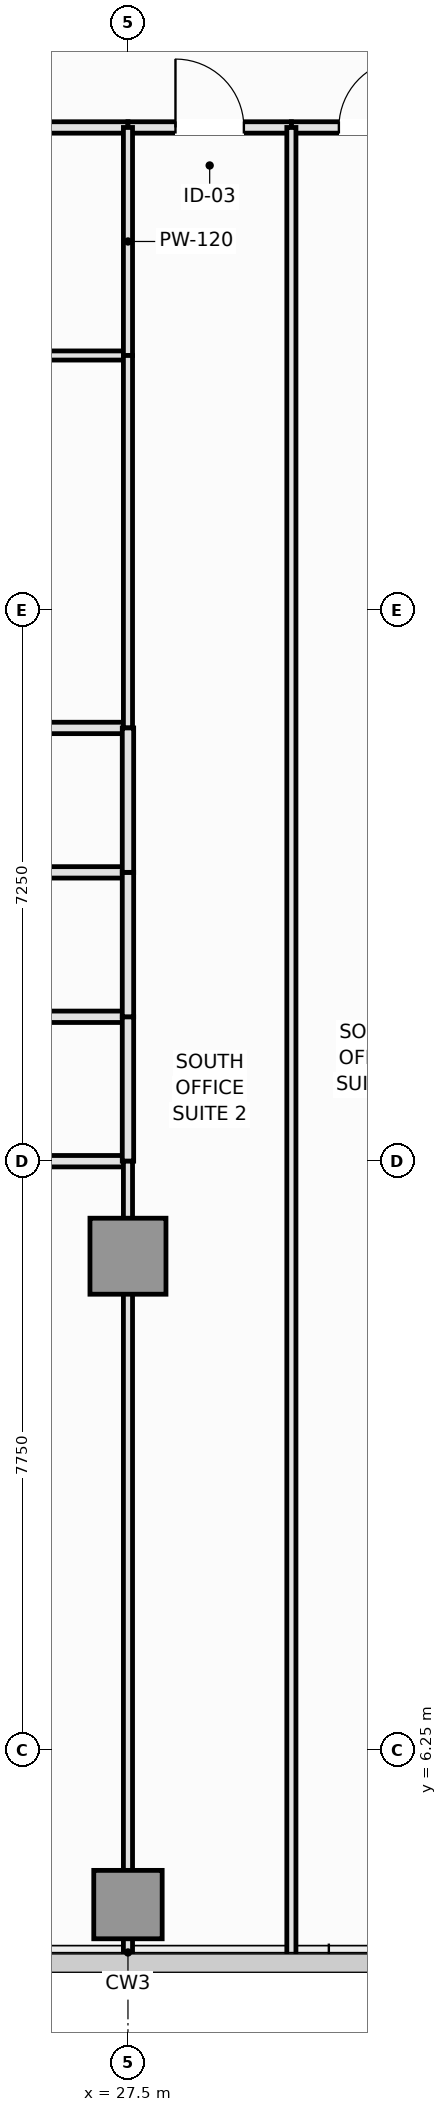
"""IFC4 building model, lengths in metres.
Left out: names, types, materials, properties, quantities, classifications, styles, units other than length and angle.
Written with IfcOpenShell. Run it as: python <this file> out.ifc"""

import sys

from ifc_helpers import new_model, si_unit, direction, frame, frame_2d, origin, origin_2d, place, context, subcontext, project, spatial, rectangle, extrude, element, fill, save


model = new_model("IFC4")
c1 = context("Model", 3, precision=1e-05, world=origin(), true_north=direction((0.0, 1.0)))
c2 = subcontext(c1, "Body", "Model", "MODEL_VIEW")
j1 = project(units=[si_unit("LENGTHUNIT", "METRE"), si_unit("PLANEANGLEUNIT", "RADIAN")], contexts=[c1])
p1 = place(None, origin())
s1 = spatial("IfcSite", under=j1, at=p1, CompositionType="ELEMENT")
p2 = place(p1, origin())
s2 = spatial("IfcBuilding", under=s1, at=p2, CompositionType="ELEMENT")
p3 = place(p2, frame((0.0, 0.0, 159.05)))
s3 = spatial("IfcBuildingStorey", under=s2, at=p3, CompositionType="ELEMENT", Elevation=159.05)
p4 = place(p3, frame((27.5, 12.75, 0.0), z_axis=(0.0, 0.0, 1.0), x_axis=(1.0, 0.0, 0.0)))
e1 = element("IfcColumn", 1, at=p4, inside=s3, PredefinedType="COLUMN", context=c2, shape_type="SweptSolid", body=[
    extrude(rectangle(XDim=1.0, YDim=1.0, at=origin_2d()), origin(), (0.0, 0.0, 1.0), 3.55),
])
p5 = place(p3, frame((27.5, 4.22, 0.0), z_axis=(0.0, 0.0, 1.0), x_axis=(1.0, 0.0, 0.0)))
e2 = element("IfcColumn", 2, at=p5, inside=s3, PredefinedType="COLUMN", context=c2, shape_type="SweptSolid", body=[
    extrude(rectangle(XDim=0.9, YDim=0.9, at=origin_2d()), origin(), (0.0, 0.0, 1.0), 3.55),
])
p6 = place(p3, frame((23.2, 27.6, 0.0), z_axis=(0.0, 0.0, 1.0), x_axis=(1.0, 0.0, 0.0)))
e3 = element("IfcWall", 3, at=p6, inside=s3, PredefinedType="PARTITIONING", context=c2, shape_type="SweptSolid", body=[
    extrude(rectangle(XDim=4.3, YDim=0.15, at=frame_2d((2.15, 0.0))), origin(), (0.0, 0.0, 1.0), 3.37),
])
p7 = place(p6, frame((1.65, 0.0, 0.0)))
e4 = element("IfcOpeningElement", 4, at=p7, cuts=e3, PredefinedType="OPENING", context=c2, shape_type="SweptSolid", body=[
    extrude(rectangle(XDim=1.0, YDim=2.15, at=frame_2d((0.5, 1.075))), frame((0.0, 0.085, 0.0), z_axis=(0.0, -1.0, 0.0), x_axis=(1.0, 0.0, 0.0)), (0.0, 0.0, 1.0), 0.17),
])
p8 = place(p3, frame((27.5, 27.6, 0.0), z_axis=(0.0, 0.0, 1.0), x_axis=(1.0, 0.0, 0.0)))
e5 = element("IfcWall", 5, at=p8, inside=s3, PredefinedType="PARTITIONING", context=c2, shape_type="SweptSolid", body=[
    extrude(rectangle(XDim=2.15, YDim=0.15, at=frame_2d((1.075, 0.0))), origin(), (0.0, 0.0, 1.0), 3.37),
])
p9 = place(p8, frame((0.625, 0.0, 0.0)))
e6 = element("IfcOpeningElement", 6, at=p9, cuts=e5, PredefinedType="OPENING", context=c2, shape_type="SweptSolid", body=[
    extrude(rectangle(XDim=0.9, YDim=2.1, at=frame_2d((0.45, 1.05))), frame((0.0, 0.085, 0.0), z_axis=(0.0, -1.0, 0.0), x_axis=(1.0, 0.0, 0.0)), (0.0, 0.0, 1.0), 0.17),
])
p10 = place(p3, frame((29.65, 27.6, 0.0), z_axis=(0.0, 0.0, 1.0), x_axis=(1.0, 0.0, 0.0)))
e7 = element("IfcWall", 7, at=p10, inside=s3, PredefinedType="PARTITIONING", context=c2, shape_type="SweptSolid", body=[
    extrude(rectangle(XDim=2.15, YDim=0.15, at=frame_2d((1.075, 0.0))), origin(), (0.0, 0.0, 1.0), 3.37),
])
p11 = place(p10, frame((0.625, 0.0, 0.0)))
e8 = element("IfcOpeningElement", 8, at=p11, cuts=e7, PredefinedType="OPENING", context=c2, shape_type="SweptSolid", body=[
    extrude(rectangle(XDim=0.9, YDim=2.1, at=frame_2d((0.45, 1.05))), frame((0.0, 0.085, 0.0), z_axis=(0.0, -1.0, 0.0), x_axis=(1.0, 0.0, 0.0)), (0.0, 0.0, 1.0), 0.17),
])
p12 = place(p3, frame((23.2, 24.6, 0.0), z_axis=(0.0, 0.0, 1.0), x_axis=(1.0, 0.0, 0.0)))
e9 = element("IfcWall", 9, at=p12, inside=s3, PredefinedType="PARTITIONING", context=c2, shape_type="SweptSolid", body=[
    extrude(rectangle(XDim=4.3, YDim=0.12, at=frame_2d((2.15, 0.0))), origin(), (0.0, 0.0, 1.0), 3.37),
])
p13 = place(p3, frame((27.5, 24.6, 0.0), z_axis=(0.0, 0.0, 1.0), x_axis=(0.0, 1.0, 0.0)))
e10 = element("IfcWall", 10, at=p13, inside=s3, PredefinedType="PARTITIONING", context=c2, shape_type="SweptSolid", body=[
    extrude(rectangle(XDim=3.0, YDim=0.12, at=frame_2d((1.5, 0.0))), origin(), (0.0, 0.0, 1.0), 3.37),
])
p14 = place(p3, frame((19.95, 19.7, 0.0), z_axis=(0.0, 0.0, 1.0), x_axis=(1.0, 0.0, 0.0)))
e11 = element("IfcWall", 11, at=p14, inside=s3, PredefinedType="PLUMBINGWALL", context=c2, shape_type="SweptSolid", body=[
    extrude(rectangle(XDim=7.55, YDim=0.15, at=frame_2d((3.775, 0.0))), origin(), (0.0, 0.0, 1.0), 3.37),
])
p15 = place(p3, frame((27.5, 19.7, 0.0), z_axis=(0.0, 0.0, 1.0), x_axis=(0.0, 1.0, 0.0)))
e12 = element("IfcWall", 12, at=p15, inside=s3, PredefinedType="PARTITIONING", context=c2, shape_type="SweptSolid", body=[
    extrude(rectangle(XDim=4.9, YDim=0.12, at=frame_2d((2.45, 0.0))), origin(), (0.0, 0.0, 1.0), 3.37),
])
for number, where, z_axis, x_axis in (
    (13, (19.95, 15.9, 0.0), (0.0, 0.0, 1.0), (1.0, 0.0, 0.0)),
    (14, (19.95, 14.0, 0.0), (0.0, 0.0, 1.0), (1.0, 0.0, 0.0)),
):
    element("IfcWall", number, at=place(p3, frame(where, z_axis=z_axis, x_axis=x_axis)), inside=s3, PredefinedType="PLUMBINGWALL", context=c2, shape_type="SweptSolid", body=[
        extrude(rectangle(XDim=7.55, YDim=0.15, at=frame_2d((3.775, 0.0))), origin(), (0.0, 0.0, 1.0), 3.37),
    ])
p16 = place(p3, frame((27.5, 14.0, 0.0), z_axis=(0.0, 0.0, 1.0), x_axis=(0.0, 1.0, 0.0)))
e15 = element("IfcWall", 15, at=p16, inside=s3, PredefinedType="PLUMBINGWALL", context=c2, shape_type="SweptSolid", body=[
    extrude(rectangle(XDim=1.9, YDim=0.15, at=frame_2d((0.95, 0.0))), origin(), (0.0, 0.0, 1.0), 3.37),
])
p17 = place(p3, frame((19.95, 17.8, 0.0), z_axis=(0.0, 0.0, 1.0), x_axis=(1.0, 0.0, 0.0)))
e16 = element("IfcWall", 16, at=p17, inside=s3, PredefinedType="PLUMBINGWALL", context=c2, shape_type="SweptSolid", body=[
    extrude(rectangle(XDim=7.55, YDim=0.15, at=frame_2d((3.775, 0.0))), origin(), (0.0, 0.0, 1.0), 3.37),
])
p18 = place(p3, frame((27.5, 15.9, 0.0), z_axis=(0.0, 0.0, 1.0), x_axis=(0.0, 1.0, 0.0)))
e17 = element("IfcWall", 17, at=p18, inside=s3, PredefinedType="PLUMBINGWALL", context=c2, shape_type="SweptSolid", body=[
    extrude(rectangle(XDim=1.9, YDim=0.15, at=frame_2d((0.95, 0.0))), origin(), (0.0, 0.0, 1.0), 3.37),
])
p19 = place(p3, frame((27.5, 17.8, 0.0), z_axis=(0.0, 0.0, 1.0), x_axis=(0.0, 1.0, 0.0)))
e18 = element("IfcWall", 18, at=p19, inside=s3, PredefinedType="PLUMBINGWALL", context=c2, shape_type="SweptSolid", body=[
    extrude(rectangle(XDim=1.9, YDim=0.15, at=frame_2d((0.95, 0.0))), origin(), (0.0, 0.0, 1.0), 3.37),
])
p20 = place(p3, frame((27.5, 3.51, 0.0), z_axis=(0.0, 0.0, 1.0), x_axis=(0.0, 1.0, 0.0)))
e19 = element("IfcWall", 19, at=p20, inside=s3, PredefinedType="PARTITIONING", context=c2, shape_type="SweptSolid", body=[
    extrude(rectangle(XDim=10.49, YDim=0.12, at=frame_2d((5.245, 0.0))), origin(), (0.0, 0.0, 1.0), 2.87),
])
p21 = place(p3, frame((29.65, 3.51, 0.0), z_axis=(0.0, 0.0, 1.0), x_axis=(0.0, 1.0, 0.0)))
e20 = element("IfcWall", 20, at=p21, inside=s3, PredefinedType="PARTITIONING", context=c2, shape_type="SweptSolid", body=[
    extrude(rectangle(XDim=24.09, YDim=0.12, at=frame_2d((12.045, 0.0))), origin(), (0.0, 0.0, 1.0), 3.37),
])
p22 = place(p9, origin())
e21 = element("IfcDoor", 21, at=p22, inside=s3, OperationType="SINGLE_SWING_LEFT", PredefinedType="DOOR", context=c2, shape_type="SweptSolid", body=[
    extrude(rectangle(XDim=0.9, YDim=2.1, at=frame_2d((0.45, 1.05))), frame((0.0, 0.025, 0.0), z_axis=(0.0, -1.0, 0.0), x_axis=(1.0, 0.0, 0.0)), (0.0, 0.0, 1.0), 0.05),
])
fill(e6, e21)
p23 = place(p11, origin())
e22 = element("IfcDoor", 22, at=p23, inside=s3, OperationType="SINGLE_SWING_RIGHT", PredefinedType="DOOR", context=c2, shape_type="SweptSolid", body=[
    extrude(rectangle(XDim=0.9, YDim=2.1, at=frame_2d((0.45, 1.05))), frame((0.0, 0.025, 0.0), z_axis=(0.0, -1.0, 0.0), x_axis=(1.0, 0.0, 0.0)), (0.0, 0.0, 1.0), 0.05),
])
fill(e8, e22)
save(model, sys.argv[1])
